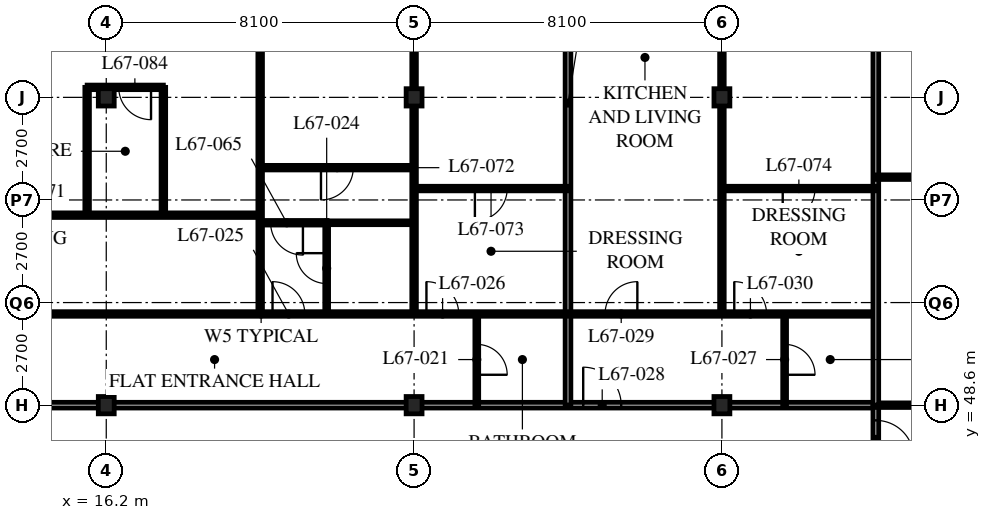
"""IFC4 building model, lengths in metres.
Left out: names, types, materials, properties, quantities, classifications, styles, units other than length and angle.
Written with IfcOpenShell. Run it as: python <this file> out.ifc"""

import sys

from ifc_helpers import new_model, si_unit, direction, frame, frame_2d, origin, origin_2d, place, context, subcontext, project, spatial, rectangle, i_section, extrude, element, fill, save


model = new_model("IFC4")
c1 = context("Model", 3, precision=1e-05, world=origin(), true_north=direction((0.0, 1.0)))
c2 = subcontext(c1, "Body", "Model", "MODEL_VIEW")
j1 = project(units=[si_unit("LENGTHUNIT", "METRE"), si_unit("PLANEANGLEUNIT", "RADIAN")], contexts=[c1])
p1 = place(None, origin())
s1 = spatial("IfcSite", under=j1, at=p1, CompositionType="ELEMENT")
p2 = place(p1, origin())
s2 = spatial("IfcBuilding", under=s1, at=p2, CompositionType="ELEMENT")
p3 = place(p2, frame((0.0, 0.0, 261.9)))
s3 = spatial("IfcBuildingStorey", under=s2, at=p3, CompositionType="ELEMENT", Elevation=261.9)
for number, where, z_axis, x_axis in (
    (1, (16.2, 48.6, 0.0), (0.0, 0.0, 1.0), (1.0, 0.0, 0.0)),
    (2, (16.2, 56.7, 0.0), (0.0, 0.0, 1.0), (1.0, 0.0, 0.0)),
    (3, (24.3, 48.6, 0.0), (0.0, 0.0, 1.0), (1.0, 0.0, 0.0)),
    (4, (24.3, 56.7, 0.0), (0.0, 0.0, 1.0), (1.0, 0.0, 0.0)),
    (5, (32.4, 48.6, 0.0), (0.0, 0.0, 1.0), (1.0, 0.0, 0.0)),
    (6, (32.4, 56.7, 0.0), (0.0, 0.0, 1.0), (1.0, 0.0, 0.0)),
):
    element("IfcColumn", number, at=place(p3, frame(where, z_axis=z_axis, x_axis=x_axis)), inside=s3, PredefinedType="COLUMN", context=c2, shape_type="SweptSolid", body=[
        extrude(i_section(OverallWidth=0.418, OverallDepth=0.456, WebThickness=0.042, FlangeThickness=0.067, FilletRadius=0.015, at=origin_2d()), origin(), (0.0, 0.0, 1.0), 3.9),
    ])
p4 = place(p3, frame((8.1, 48.6, 0.0), z_axis=(0.0, 0.0, 1.0), x_axis=(1.0, 0.0, 0.0)))
e7 = element("IfcWall", 7, at=p4, inside=s3, PredefinedType="PARTITIONING", context=c2, shape_type="SweptSolid", body=[
    extrude(rectangle(XDim=28.35, YDim=0.15, at=frame_2d((14.175, 0.0))), origin(), (0.0, 0.0, 1.0), 3.078),
])
p5 = place(p4, frame((4.45, 0.0, 0.0)))
e8 = element("IfcOpeningElement", 8, at=p5, cuts=e7, PredefinedType="OPENING", context=c2, shape_type="SweptSolid", body=[
    extrude(rectangle(XDim=1.0, YDim=2.1, at=frame_2d((0.5, 1.05))), frame((0.0, 0.085, 0.0), z_axis=(0.0, -1.0, 0.0), x_axis=(1.0, 0.0, 0.0)), (0.0, 0.0, 1.0), 0.17),
])
p6 = place(p4, frame((20.65, 0.0, 0.0)))
e9 = element("IfcOpeningElement", 9, at=p6, cuts=e7, PredefinedType="OPENING", context=c2, shape_type="SweptSolid", body=[
    extrude(rectangle(XDim=1.0, YDim=2.1, at=frame_2d((0.5, 1.05))), frame((0.0, 0.085, 0.0), z_axis=(0.0, -1.0, 0.0), x_axis=(1.0, 0.0, 0.0)), (0.0, 0.0, 1.0), 0.17),
])
p7 = place(p4, frame((1.525, 0.0, 0.0)))
e10 = element("IfcOpeningElement", 10, at=p7, cuts=e7, PredefinedType="OPENING", context=c2, shape_type="SweptSolid", body=[
    extrude(rectangle(XDim=1.0, YDim=2.1, at=frame_2d((0.5, 1.05))), frame((0.0, 0.085, 0.0), z_axis=(0.0, -1.0, 0.0), x_axis=(1.0, 0.0, 0.0)), (0.0, 0.0, 1.0), 0.17),
])
p8 = place(p3, frame((36.45, 46.8, 0.0), z_axis=(0.0, 0.0, 1.0), x_axis=(0.0, 1.0, 0.0)))
e11 = element("IfcWall", 11, at=p8, inside=s3, PredefinedType="PARTITIONING", context=c2, shape_type="SweptSolid", body=[
    extrude(rectangle(XDim=1.8, YDim=0.15, at=frame_2d((0.9, 0.0))), origin(), (0.0, 0.0, 1.0), 3.69),
])
p9 = place(p8, frame((0.4, 0.0, 0.0)))
e12 = element("IfcOpeningElement", 12, at=p9, cuts=e11, PredefinedType="OPENING", context=c2, shape_type="SweptSolid", body=[
    extrude(rectangle(XDim=1.0, YDim=2.1, at=frame_2d((0.5, 1.05))), frame((0.0, 0.085, 0.0), z_axis=(0.0, -1.0, 0.0), x_axis=(1.0, 0.0, 0.0)), (0.0, 0.0, 1.0), 0.17),
])
p10 = place(p3, frame((25.95, 48.6, 0.0), z_axis=(0.0, 0.0, 1.0), x_axis=(0.0, 1.0, 0.0)))
e13 = element("IfcWall", 13, at=p10, inside=s3, PredefinedType="PARTITIONING", context=c2, shape_type="SweptSolid", body=[
    extrude(rectangle(XDim=2.4, YDim=0.1, at=frame_2d((1.2, 0.0))), origin(), (0.0, 0.0, 1.0), 3.69),
])
p11 = place(p10, frame((0.8, 0.0, 0.0)))
e14 = element("IfcOpeningElement", 14, at=p11, cuts=e13, PredefinedType="OPENING", context=c2, shape_type="SweptSolid", body=[
    extrude(rectangle(XDim=0.8, YDim=2.1, at=frame_2d((0.4, 1.05))), frame((0.0, 0.06, 0.0), z_axis=(0.0, -1.0, 0.0), x_axis=(1.0, 0.0, 0.0)), (0.0, 0.0, 1.0), 0.12),
])
p12 = place(p3, frame((22.0, 51.0, 0.0), z_axis=(0.0, 0.0, 1.0), x_axis=(0.0, 1.0, 0.0)))
e15 = element("IfcWall", 15, at=p12, inside=s3, PredefinedType="PARTITIONING", context=c2, shape_type="SweptSolid", body=[
    extrude(rectangle(XDim=2.4, YDim=0.1, at=frame_2d((1.2, 0.0))), origin(), (0.0, 0.0, 1.0), 3.69),
])
p13 = place(p12, frame((0.8, 0.0, 0.0)))
e16 = element("IfcOpeningElement", 16, at=p13, cuts=e15, PredefinedType="OPENING", context=c2, shape_type="SweptSolid", body=[
    extrude(rectangle(XDim=0.8, YDim=2.1, at=frame_2d((0.4, 1.05))), frame((0.0, 0.06, 0.0), z_axis=(0.0, -1.0, 0.0), x_axis=(1.0, 0.0, 0.0)), (0.0, 0.0, 1.0), 0.12),
])
p14 = place(p3, frame((22.0, 53.4, 0.0), z_axis=(0.0, 0.0, 1.0), x_axis=(1.0, 0.0, 0.0)))
e17 = element("IfcWall", 17, at=p14, inside=s3, PredefinedType="PARTITIONING", context=c2, shape_type="SweptSolid", body=[
    extrude(rectangle(XDim=2.3, YDim=0.1, at=frame_2d((1.15, 0.0))), origin(), (0.0, 0.0, 1.0), 3.69),
])
p15 = place(p3, frame((20.25, 51.0, 0.0), z_axis=(0.0, 0.0, 1.0), x_axis=(0.0, 1.0, 0.0)))
e18 = element("IfcWall", 18, at=p15, inside=s3, PredefinedType="PARTITIONING", context=c2, shape_type="SweptSolid", body=[
    extrude(rectangle(XDim=13.5, YDim=0.12, at=frame_2d((6.75, 0.0))), origin(), (0.0, 0.0, 1.0), 3.69),
])
p16 = place(p3, frame((24.3, 51.0, 0.0), z_axis=(0.0, 0.0, 1.0), x_axis=(0.0, 1.0, 0.0)))
e19 = element("IfcWall", 19, at=p16, inside=s3, PredefinedType="PARTITIONING", context=c2, shape_type="SweptSolid", body=[
    extrude(rectangle(XDim=13.5, YDim=0.12, at=frame_2d((6.75, 0.0))), origin(), (0.0, 0.0, 1.0), 3.078),
])
p17 = place(p3, frame((28.35, 48.6, 0.0), z_axis=(0.0, 0.0, 1.0), x_axis=(0.0, 1.0, 0.0)))
e20 = element("IfcWall", 20, at=p17, inside=s3, PredefinedType="PARTITIONING", context=c2, shape_type="SweptSolid", body=[
    extrude(rectangle(XDim=15.9, YDim=0.15, at=frame_2d((7.95, 0.0))), origin(), (0.0, 0.0, 1.0), 3.69),
])
p18 = place(p3, frame((34.05, 48.6, 0.0), z_axis=(0.0, 0.0, 1.0), x_axis=(0.0, 1.0, 0.0)))
e21 = element("IfcWall", 21, at=p18, inside=s3, PredefinedType="PARTITIONING", context=c2, shape_type="SweptSolid", body=[
    extrude(rectangle(XDim=2.4, YDim=0.1, at=frame_2d((1.2, 0.0))), origin(), (0.0, 0.0, 1.0), 3.69),
])
p19 = place(p18, frame((0.8, 0.0, 0.0)))
e22 = element("IfcOpeningElement", 22, at=p19, cuts=e21, PredefinedType="OPENING", context=c2, shape_type="SweptSolid", body=[
    extrude(rectangle(XDim=0.8, YDim=2.1, at=frame_2d((0.4, 1.05))), frame((0.0, 0.06, 0.0), z_axis=(0.0, -1.0, 0.0), x_axis=(1.0, 0.0, 0.0)), (0.0, 0.0, 1.0), 0.12),
])
p20 = place(p3, frame((32.4, 51.0, 0.0), z_axis=(0.0, 0.0, 1.0), x_axis=(0.0, 1.0, 0.0)))
e23 = element("IfcWall", 23, at=p20, inside=s3, PredefinedType="PARTITIONING", context=c2, shape_type="SweptSolid", body=[
    extrude(rectangle(XDim=13.5, YDim=0.12, at=frame_2d((6.75, 0.0))), origin(), (0.0, 0.0, 1.0), 3.078),
])
p21 = place(p3, frame((4.1, 51.0, 0.0), z_axis=(0.0, 0.0, 1.0), x_axis=(1.0, 0.0, 0.0)))
e24 = element("IfcWall", 24, at=p21, inside=s3, PredefinedType="PARTITIONING", context=c2, shape_type="SweptSolid", body=[
    extrude(rectangle(XDim=32.35, YDim=0.12, at=frame_2d((16.175, 0.0))), origin(), (0.0, 0.0, 1.0), 3.69),
])
p22 = place(p21, frame((9.025, 0.0, 0.0)))
e25 = element("IfcOpeningElement", 25, at=p22, cuts=e24, PredefinedType="OPENING", context=c2, shape_type="SweptSolid", body=[
    extrude(rectangle(XDim=0.85, YDim=2.1, at=frame_2d((0.425, 1.05))), frame((0.0, 0.07, 0.0), z_axis=(0.0, -1.0, 0.0), x_axis=(1.0, 0.0, 0.0)), (0.0, 0.0, 1.0), 0.14),
])
p23 = place(p21, frame((16.475, 0.0, 0.0)))
e26 = element("IfcOpeningElement", 26, at=p23, cuts=e24, PredefinedType="OPENING", context=c2, shape_type="SweptSolid", body=[
    extrude(rectangle(XDim=0.85, YDim=2.1, at=frame_2d((0.425, 1.05))), frame((0.0, 0.07, 0.0), z_axis=(0.0, -1.0, 0.0), x_axis=(1.0, 0.0, 0.0)), (0.0, 0.0, 1.0), 0.14),
])
p24 = place(p21, frame((20.525, 0.0, 0.0)))
e27 = element("IfcOpeningElement", 27, at=p24, cuts=e24, PredefinedType="OPENING", context=c2, shape_type="SweptSolid", body=[
    extrude(rectangle(XDim=0.85, YDim=2.1, at=frame_2d((0.425, 1.05))), frame((0.0, 0.07, 0.0), z_axis=(0.0, -1.0, 0.0), x_axis=(1.0, 0.0, 0.0)), (0.0, 0.0, 1.0), 0.14),
])
p25 = place(p21, frame((25.225, 0.0, 0.0)))
e28 = element("IfcOpeningElement", 28, at=p25, cuts=e24, PredefinedType="OPENING", context=c2, shape_type="SweptSolid", body=[
    extrude(rectangle(XDim=0.85, YDim=2.1, at=frame_2d((0.425, 1.05))), frame((0.0, 0.07, 0.0), z_axis=(0.0, -1.0, 0.0), x_axis=(1.0, 0.0, 0.0)), (0.0, 0.0, 1.0), 0.14),
])
p26 = place(p21, frame((28.625, 0.0, 0.0)))
e29 = element("IfcOpeningElement", 29, at=p26, cuts=e24, PredefinedType="OPENING", context=c2, shape_type="SweptSolid", body=[
    extrude(rectangle(XDim=0.85, YDim=2.1, at=frame_2d((0.425, 1.05))), frame((0.0, 0.07, 0.0), z_axis=(0.0, -1.0, 0.0), x_axis=(1.0, 0.0, 0.0)), (0.0, 0.0, 1.0), 0.14),
])
p27 = place(p21, frame((6.725, 0.0, 0.0)))
e30 = element("IfcOpeningElement", 30, at=p27, cuts=e24, PredefinedType="OPENING", context=c2, shape_type="SweptSolid", body=[
    extrude(rectangle(XDim=0.85, YDim=2.1, at=frame_2d((0.425, 1.05))), frame((0.0, 0.07, 0.0), z_axis=(0.0, -1.0, 0.0), x_axis=(1.0, 0.0, 0.0)), (0.0, 0.0, 1.0), 0.14),
])
p28 = place(p21, frame((2.875, 0.0, 0.0)))
e31 = element("IfcOpeningElement", 31, at=p28, cuts=e24, PredefinedType="OPENING", context=c2, shape_type="SweptSolid", body=[
    extrude(rectangle(XDim=0.85, YDim=2.1, at=frame_2d((0.425, 1.05))), frame((0.0, 0.07, 0.0), z_axis=(0.0, -1.0, 0.0), x_axis=(1.0, 0.0, 0.0)), (0.0, 0.0, 1.0), 0.14),
])
p29 = place(p3, frame((36.45, 48.6, 0.0), z_axis=(0.0, 0.0, 1.0), x_axis=(1.0, 0.0, 0.0)))
e32 = element("IfcWall", 32, at=p29, inside=s3, PredefinedType="PARTITIONING", context=c2, shape_type="SweptSolid", body=[
    extrude(rectangle(XDim=6.45, YDim=0.12, at=frame_2d((3.225, 0.0))), origin(), (0.0, 0.0, 1.0), 3.078),
])
p30 = place(p29, frame((2.3, 0.0, 0.0)))
e33 = element("IfcOpeningElement", 33, at=p30, cuts=e32, PredefinedType="OPENING", context=c2, shape_type="SweptSolid", body=[
    extrude(rectangle(XDim=0.85, YDim=2.1, at=frame_2d((0.425, 1.05))), frame((0.0, 0.07, 0.0), z_axis=(0.0, -1.0, 0.0), x_axis=(1.0, 0.0, 0.0)), (0.0, 0.0, 1.0), 0.14),
])
p31 = place(p3, frame((36.45, 64.5, 0.0), z_axis=(0.0, 0.0, 1.0), x_axis=(0.0, -1.0, 0.0)))
e34 = element("IfcWall", 34, at=p31, inside=s3, PredefinedType="PARTITIONING", context=c2, shape_type="SweptSolid", body=[
    extrude(rectangle(XDim=15.9, YDim=0.15, at=frame_2d((7.95, 0.0))), origin(), (0.0, 0.0, 1.0), 3.69),
])
p32 = place(p3, frame((36.45, 54.6, 0.0), z_axis=(0.0, 0.0, 1.0), x_axis=(1.0, 0.0, 0.0)))
e35 = element("IfcWall", 35, at=p32, inside=s3, PredefinedType="PARTITIONING", context=c2, shape_type="SweptSolid", body=[
    extrude(rectangle(XDim=19.95, YDim=0.12, at=frame_2d((9.975, 0.0))), origin(), (0.0, 0.0, 1.0), 3.69),
])
p33 = place(p32, frame((1.675, 0.0, 0.0)))
e36 = element("IfcOpeningElement", 36, at=p33, cuts=e35, PredefinedType="OPENING", context=c2, shape_type="SweptSolid", body=[
    extrude(rectangle(XDim=0.85, YDim=2.1, at=frame_2d((0.425, 1.05))), frame((0.0, 0.07, 0.0), z_axis=(0.0, -1.0, 0.0), x_axis=(1.0, 0.0, 0.0)), (0.0, 0.0, 1.0), 0.14),
])
p34 = place(p3, frame((20.25, 53.4, 0.0), z_axis=(0.0, 0.0, 1.0), x_axis=(1.0, 0.0, 0.0)))
e37 = element("IfcWall", 37, at=p34, inside=s3, PredefinedType="PARTITIONING", context=c2, shape_type="SweptSolid", body=[
    extrude(rectangle(XDim=1.76, YDim=0.12, at=frame_2d((0.88, 0.0))), origin(), (0.0, 0.0, 1.0), 3.69),
])
p35 = place(p34, frame((0.275, 0.0, 0.0)))
e38 = element("IfcOpeningElement", 38, at=p35, cuts=e37, PredefinedType="OPENING", context=c2, shape_type="SweptSolid", body=[
    extrude(rectangle(XDim=0.85, YDim=2.1, at=frame_2d((0.425, 1.05))), frame((0.0, 0.07, 0.0), z_axis=(0.0, -1.0, 0.0), x_axis=(1.0, 0.0, 0.0)), (0.0, 0.0, 1.0), 0.14),
])
p36 = place(p3, frame((12.15, 53.6, 0.0), z_axis=(0.0, 0.0, 1.0), x_axis=(1.0, 0.0, 0.0)))
e39 = element("IfcWall", 39, at=p36, inside=s3, PredefinedType="PARTITIONING", context=c2, shape_type="SweptSolid", body=[
    extrude(rectangle(XDim=8.1, YDim=0.12, at=frame_2d((4.05, 0.0))), origin(), (0.0, 0.0, 1.0), 3.69),
])
p37 = place(p36, frame((1.675, 0.0, 0.0)))
e40 = element("IfcOpeningElement", 40, at=p37, cuts=e39, PredefinedType="OPENING", context=c2, shape_type="SweptSolid", body=[
    extrude(rectangle(XDim=0.85, YDim=2.1, at=frame_2d((0.425, 1.05))), frame((0.0, 0.07, 0.0), z_axis=(0.0, -1.0, 0.0), x_axis=(1.0, 0.0, 0.0)), (0.0, 0.0, 1.0), 0.14),
])
p38 = place(p3, frame((20.25, 54.85, 0.0), z_axis=(0.0, 0.0, 1.0), x_axis=(1.0, 0.0, 0.0)))
e41 = element("IfcWall", 41, at=p38, inside=s3, PredefinedType="PARTITIONING", context=c2, shape_type="SweptSolid", body=[
    extrude(rectangle(XDim=4.05, YDim=0.12, at=frame_2d((2.025, 0.0))), origin(), (0.0, 0.0, 1.0), 3.69),
])
p39 = place(p38, frame((1.6, 0.0, 0.0)))
e42 = element("IfcOpeningElement", 42, at=p39, cuts=e41, PredefinedType="OPENING", context=c2, shape_type="SweptSolid", body=[
    extrude(rectangle(XDim=0.85, YDim=2.1, at=frame_2d((0.425, 1.05))), frame((0.0, 0.07, 0.0), z_axis=(0.0, -1.0, 0.0), x_axis=(1.0, 0.0, 0.0)), (0.0, 0.0, 1.0), 0.14),
])
p40 = place(p3, frame((24.3, 54.3, 0.0), z_axis=(0.0, 0.0, 1.0), x_axis=(1.0, 0.0, 0.0)))
e43 = element("IfcWall", 43, at=p40, inside=s3, PredefinedType="PARTITIONING", context=c2, shape_type="SweptSolid", body=[
    extrude(rectangle(XDim=4.05, YDim=0.12, at=frame_2d((2.025, 0.0))), origin(), (0.0, 0.0, 1.0), 3.69),
])
p41 = place(p40, frame((1.6, 0.0, 0.0)))
e44 = element("IfcOpeningElement", 44, at=p41, cuts=e43, PredefinedType="OPENING", context=c2, shape_type="SweptSolid", body=[
    extrude(rectangle(XDim=0.85, YDim=2.1, at=frame_2d((0.425, 1.05))), frame((0.0, 0.07, 0.0), z_axis=(0.0, -1.0, 0.0), x_axis=(1.0, 0.0, 0.0)), (0.0, 0.0, 1.0), 0.14),
])
p42 = place(p3, frame((32.4, 54.3, 0.0), z_axis=(0.0, 0.0, 1.0), x_axis=(1.0, 0.0, 0.0)))
e45 = element("IfcWall", 45, at=p42, inside=s3, PredefinedType="PARTITIONING", context=c2, shape_type="SweptSolid", body=[
    extrude(rectangle(XDim=4.05, YDim=0.12, at=frame_2d((2.025, 0.0))), origin(), (0.0, 0.0, 1.0), 3.69),
])
p43 = place(p42, frame((1.6, 0.0, 0.0)))
e46 = element("IfcOpeningElement", 46, at=p43, cuts=e45, PredefinedType="OPENING", context=c2, shape_type="SweptSolid", body=[
    extrude(rectangle(XDim=0.85, YDim=2.1, at=frame_2d((0.425, 1.05))), frame((0.0, 0.07, 0.0), z_axis=(0.0, -1.0, 0.0), x_axis=(1.0, 0.0, 0.0)), (0.0, 0.0, 1.0), 0.14),
])
for number, where, z_axis, x_axis in (
    (47, (15.697, 53.6, 0.0), (0.0, 0.0, 1.0), (0.0, 1.0, 0.0)),
    (48, (17.703, 53.6, 0.0), (0.0, 0.0, 1.0), (0.0, 1.0, 0.0)),
):
    element("IfcWall", number, at=place(p3, frame(where, z_axis=z_axis, x_axis=x_axis)), inside=s3, PredefinedType="PARTITIONING", context=c2, shape_type="SweptSolid", body=[
        extrude(rectangle(XDim=3.363, YDim=0.12, at=frame_2d((1.681, 0.0))), origin(), (0.0, 0.0, 1.0), 3.69),
    ])
p44 = place(p3, frame((15.697, 56.963, 0.0), z_axis=(0.0, 0.0, 1.0), x_axis=(1.0, 0.0, 0.0)))
e49 = element("IfcWall", 49, at=p44, inside=s3, PredefinedType="PARTITIONING", context=c2, shape_type="SweptSolid", body=[
    extrude(rectangle(XDim=2.006, YDim=0.12, at=frame_2d((1.003, 0.0))), origin(), (0.0, 0.0, 1.0), 3.69),
])
p45 = place(p44, frame((0.831, 0.0, 0.0)))
e50 = element("IfcOpeningElement", 50, at=p45, cuts=e49, PredefinedType="OPENING", context=c2, shape_type="SweptSolid", body=[
    extrude(rectangle(XDim=0.85, YDim=2.1, at=frame_2d((0.425, 1.05))), frame((0.0, 0.07, 0.0), z_axis=(0.0, -1.0, 0.0), x_axis=(1.0, 0.0, 0.0)), (0.0, 0.0, 1.0), 0.14),
])
p46 = place(p11, origin())
e51 = element("IfcDoor", 51, at=p46, inside=s3, OperationType="SINGLE_SWING_RIGHT", PredefinedType="DOOR", context=c2, shape_type="SweptSolid", body=[
    extrude(rectangle(XDim=0.8, YDim=2.1, at=frame_2d((0.4, 1.05))), frame((0.0, 0.025, 0.0), z_axis=(0.0, -1.0, 0.0), x_axis=(1.0, 0.0, 0.0)), (0.0, 0.0, 1.0), 0.05),
])
fill(e14, e51)
p47 = place(p13, origin())
e52 = element("IfcDoor", 52, at=p47, inside=s3, OperationType="SINGLE_SWING_RIGHT", PredefinedType="DOOR", context=c2, shape_type="SweptSolid", body=[
    extrude(rectangle(XDim=0.8, YDim=2.1, at=frame_2d((0.4, 1.05))), frame((0.0, 0.025, 0.0), z_axis=(0.0, -1.0, 0.0), x_axis=(1.0, 0.0, 0.0)), (0.0, 0.0, 1.0), 0.05),
])
fill(e16, e52)
p48 = place(p23, origin())
e53 = element("IfcDoor", 53, at=p48, inside=s3, OperationType="SINGLE_SWING_LEFT", PredefinedType="DOOR", context=c2, shape_type="SweptSolid", body=[
    extrude(rectangle(XDim=0.85, YDim=2.1, at=frame_2d((0.425, 1.05))), frame((0.0, 0.025, 0.0), z_axis=(0.0, -1.0, 0.0), x_axis=(1.0, 0.0, 0.0)), (0.0, 0.0, 1.0), 0.05),
])
fill(e26, e53)
p49 = place(p24, origin())
e54 = element("IfcDoor", 54, at=p49, inside=s3, OperationType="SINGLE_SWING_LEFT", PredefinedType="DOOR", context=c2, shape_type="SweptSolid", body=[
    extrude(rectangle(XDim=0.85, YDim=2.1, at=frame_2d((0.425, 1.05))), frame((0.0, 0.025, 0.0), z_axis=(0.0, -1.0, 0.0), x_axis=(1.0, 0.0, 0.0)), (0.0, 0.0, 1.0), 0.05),
])
fill(e27, e54)
p50 = place(p19, origin())
e55 = element("IfcDoor", 55, at=p50, inside=s3, OperationType="SINGLE_SWING_RIGHT", PredefinedType="DOOR", context=c2, shape_type="SweptSolid", body=[
    extrude(rectangle(XDim=0.8, YDim=2.1, at=frame_2d((0.4, 1.05))), frame((0.0, 0.025, 0.0), z_axis=(0.0, -1.0, 0.0), x_axis=(1.0, 0.0, 0.0)), (0.0, 0.0, 1.0), 0.05),
])
fill(e22, e55)
p51 = place(p6, origin())
e56 = element("IfcDoor", 56, at=p51, inside=s3, OperationType="SINGLE_SWING_LEFT", PredefinedType="DOOR", context=c2, shape_type="SweptSolid", body=[
    extrude(rectangle(XDim=1.0, YDim=2.1, at=frame_2d((0.5, 1.05))), frame((0.0, 0.025, 0.0), z_axis=(0.0, -1.0, 0.0), x_axis=(1.0, 0.0, 0.0)), (0.0, 0.0, 1.0), 0.05),
])
fill(e9, e56)
p52 = place(p25, origin())
e57 = element("IfcDoor", 57, at=p52, inside=s3, OperationType="SINGLE_SWING_RIGHT", PredefinedType="DOOR", context=c2, shape_type="SweptSolid", body=[
    extrude(rectangle(XDim=0.85, YDim=2.1, at=frame_2d((0.425, 1.05))), frame((0.0, 0.025, 0.0), z_axis=(0.0, -1.0, 0.0), x_axis=(1.0, 0.0, 0.0)), (0.0, 0.0, 1.0), 0.05),
])
fill(e28, e57)
p53 = place(p26, origin())
e58 = element("IfcDoor", 58, at=p53, inside=s3, OperationType="SINGLE_SWING_LEFT", PredefinedType="DOOR", context=c2, shape_type="SweptSolid", body=[
    extrude(rectangle(XDim=0.85, YDim=2.1, at=frame_2d((0.425, 1.05))), frame((0.0, 0.025, 0.0), z_axis=(0.0, -1.0, 0.0), x_axis=(1.0, 0.0, 0.0)), (0.0, 0.0, 1.0), 0.05),
])
fill(e29, e58)
p54 = place(p9, origin())
e59 = element("IfcDoor", 59, at=p54, inside=s3, OperationType="SINGLE_SWING_RIGHT", PredefinedType="DOOR", context=c2, shape_type="SweptSolid", body=[
    extrude(rectangle(XDim=1.0, YDim=2.1, at=frame_2d((0.5, 1.05))), frame((0.0, 0.025, 0.0), z_axis=(0.0, -1.0, 0.0), x_axis=(1.0, 0.0, 0.0)), (0.0, 0.0, 1.0), 0.05),
])
fill(e12, e59)
p55 = place(p35, origin())
e60 = element("IfcDoor", 60, at=p55, inside=s3, OperationType="SINGLE_SWING_LEFT", PredefinedType="DOOR", context=c2, shape_type="SweptSolid", body=[
    extrude(rectangle(XDim=0.85, YDim=2.1, at=frame_2d((0.425, 1.05))), frame((0.0, 0.025, 0.0), z_axis=(0.0, -1.0, 0.0), x_axis=(1.0, 0.0, 0.0)), (0.0, 0.0, 1.0), 0.05),
])
fill(e38, e60)
p56 = place(p39, origin())
e61 = element("IfcDoor", 61, at=p56, inside=s3, OperationType="SINGLE_SWING_RIGHT", PredefinedType="DOOR", context=c2, shape_type="SweptSolid", body=[
    extrude(rectangle(XDim=0.85, YDim=2.1, at=frame_2d((0.425, 1.05))), frame((0.0, 0.025, 0.0), z_axis=(0.0, -1.0, 0.0), x_axis=(1.0, 0.0, 0.0)), (0.0, 0.0, 1.0), 0.05),
])
fill(e42, e61)
p57 = place(p41, origin())
e62 = element("IfcDoor", 62, at=p57, inside=s3, OperationType="SINGLE_SWING_RIGHT", PredefinedType="DOOR", context=c2, shape_type="SweptSolid", body=[
    extrude(rectangle(XDim=0.85, YDim=2.1, at=frame_2d((0.425, 1.05))), frame((0.0, 0.025, 0.0), z_axis=(0.0, -1.0, 0.0), x_axis=(1.0, 0.0, 0.0)), (0.0, 0.0, 1.0), 0.05),
])
fill(e44, e62)
p58 = place(p43, origin())
e63 = element("IfcDoor", 63, at=p58, inside=s3, OperationType="SINGLE_SWING_RIGHT", PredefinedType="DOOR", context=c2, shape_type="SweptSolid", body=[
    extrude(rectangle(XDim=0.85, YDim=2.1, at=frame_2d((0.425, 1.05))), frame((0.0, 0.025, 0.0), z_axis=(0.0, -1.0, 0.0), x_axis=(1.0, 0.0, 0.0)), (0.0, 0.0, 1.0), 0.05),
])
fill(e46, e63)
p59 = place(p45, origin())
e64 = element("IfcDoor", 64, at=p59, inside=s3, OperationType="SINGLE_SWING_LEFT", PredefinedType="DOOR", context=c2, shape_type="SweptSolid", body=[
    extrude(rectangle(XDim=0.85, YDim=2.1, at=frame_2d((0.425, 1.05))), frame((0.0, 0.025, 0.0), z_axis=(0.0, -1.0, 0.0), x_axis=(1.0, 0.0, 0.0)), (0.0, 0.0, 1.0), 0.05),
])
fill(e50, e64)
save(model, sys.argv[1])
